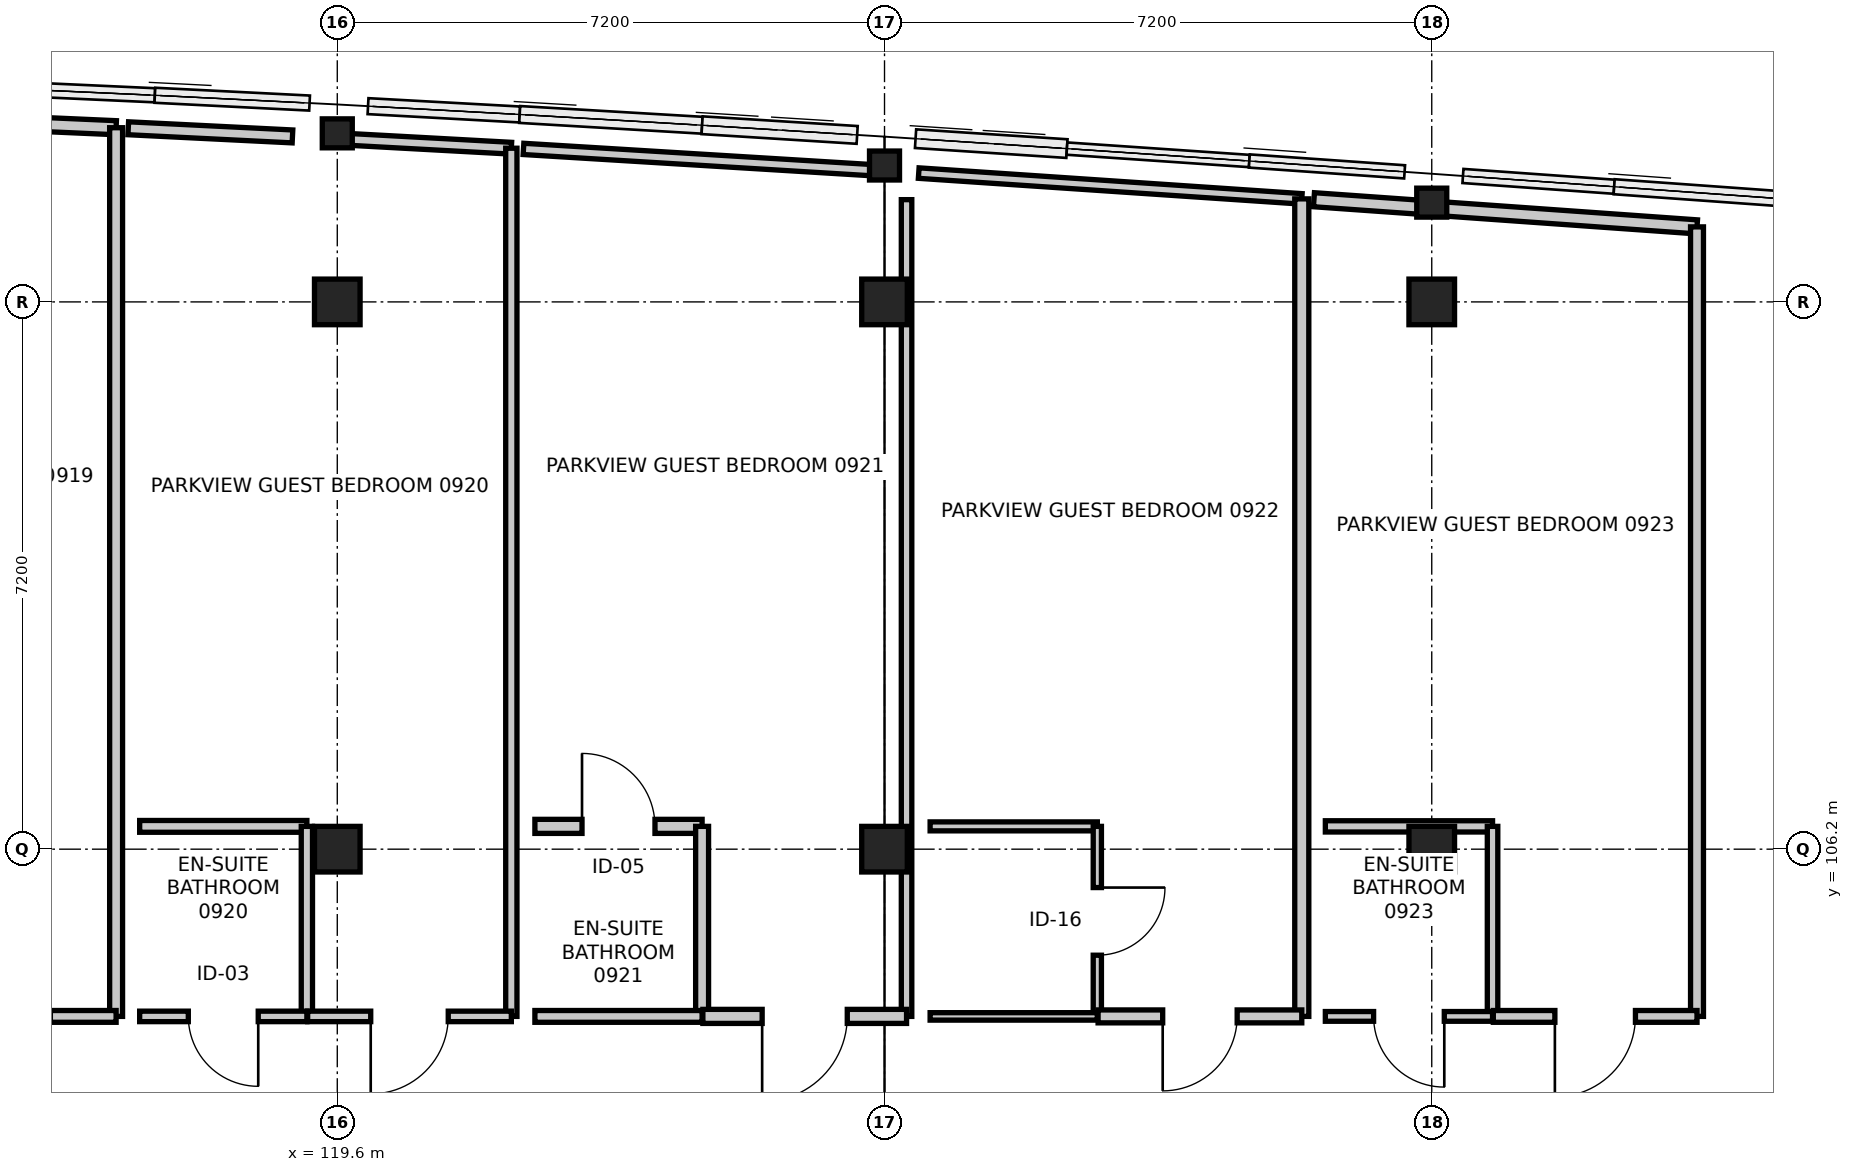
"""IFC4 building model, lengths in metres.
Left out: names, types, materials, properties, quantities, classifications, styles, units other than length and angle.
Written with IfcOpenShell. Run it as: python <this file> out.ifc"""

import sys

from ifc_helpers import new_model, si_unit, direction, frame, frame_2d, origin, origin_2d, place, context, subcontext, project, spatial, rectangle, i_section, extrude, element, fill, save


model = new_model("IFC4")
c1 = context("Model", 3, precision=1e-05, world=origin(), true_north=direction((0.0, 1.0)))
c2 = subcontext(c1, "Body", "Model", "MODEL_VIEW")
j1 = project(units=[si_unit("LENGTHUNIT", "METRE"), si_unit("PLANEANGLEUNIT", "RADIAN")], contexts=[c1])
p1 = place(None, origin())
s1 = spatial("IfcSite", under=j1, at=p1, CompositionType="ELEMENT")
p2 = place(p1, origin())
s2 = spatial("IfcBuilding", under=s1, at=p2, CompositionType="ELEMENT")
p3 = place(p2, frame((0.0, 0.0, 37.2)))
s3 = spatial("IfcBuildingStorey", under=s2, at=p3, CompositionType="ELEMENT", Elevation=37.2)
for number, where, z_axis, x_axis in (
    (1, (119.6, 106.2, 0.0), (0.0, 0.0, 1.0), (1.0, 0.0, 0.0)),
    (2, (119.6, 113.4, 0.0), (0.0, 0.0, 1.0), (1.0, 0.0, 0.0)),
):
    element("IfcColumn", number, at=place(p3, frame(where, z_axis=z_axis, x_axis=x_axis)), inside=s3, PredefinedType="COLUMN", context=c2, shape_type="SweptSolid", body=[
        extrude(rectangle(XDim=0.6, YDim=0.6, at=origin_2d()), origin(), (0.0, 0.0, 1.0), 3.6),
    ])
p4 = place(p3, frame((119.6, 115.618, 0.0), z_axis=(0.0, 0.0, 1.0), x_axis=(1.0, 0.0, 0.0)))
e3 = element("IfcColumn", 3, at=p4, inside=s3, PredefinedType="COLUMN", context=c2, shape_type="SweptSolid", body=[
    extrude(i_section(OverallWidth=0.395, OverallDepth=0.381, WebThickness=0.018, FlangeThickness=0.03, FilletRadius=0.015, at=origin_2d()), origin(), (0.0, 0.0, 1.0), 3.6),
])
for number, where, z_axis, x_axis in (
    (4, (126.8, 106.2, 0.0), (0.0, 0.0, 1.0), (1.0, 0.0, 0.0)),
    (5, (126.8, 113.4, 0.0), (0.0, 0.0, 1.0), (1.0, 0.0, 0.0)),
):
    element("IfcColumn", number, at=place(p3, frame(where, z_axis=z_axis, x_axis=x_axis)), inside=s3, PredefinedType="COLUMN", context=c2, shape_type="SweptSolid", body=[
        extrude(rectangle(XDim=0.6, YDim=0.6, at=origin_2d()), origin(), (0.0, 0.0, 1.0), 3.6),
    ])
p5 = place(p3, frame((126.8, 115.194, 0.0), z_axis=(0.0, 0.0, 1.0), x_axis=(1.0, 0.0, 0.0)))
e6 = element("IfcColumn", 6, at=p5, inside=s3, PredefinedType="COLUMN", context=c2, shape_type="SweptSolid", body=[
    extrude(i_section(OverallWidth=0.395, OverallDepth=0.381, WebThickness=0.018, FlangeThickness=0.03, FilletRadius=0.015, at=origin_2d()), origin(), (0.0, 0.0, 1.0), 3.6),
])
for number, where, z_axis, x_axis in (
    (7, (134.0, 106.2, 0.0), (0.0, 0.0, 1.0), (1.0, 0.0, 0.0)),
    (8, (134.0, 113.4, 0.0), (0.0, 0.0, 1.0), (1.0, 0.0, 0.0)),
):
    element("IfcColumn", number, at=place(p3, frame(where, z_axis=z_axis, x_axis=x_axis)), inside=s3, PredefinedType="COLUMN", context=c2, shape_type="SweptSolid", body=[
        extrude(rectangle(XDim=0.6, YDim=0.6, at=origin_2d()), origin(), (0.0, 0.0, 1.0), 5.2),
    ])
p6 = place(p3, frame((134.0, 114.706, 0.0), z_axis=(0.0, 0.0, 1.0), x_axis=(1.0, 0.0, 0.0)))
e9 = element("IfcColumn", 9, at=p6, inside=s3, PredefinedType="COLUMN", context=c2, shape_type="SweptSolid", body=[
    extrude(i_section(OverallWidth=0.395, OverallDepth=0.381, WebThickness=0.018, FlangeThickness=0.03, FilletRadius=0.015, at=origin_2d()), origin(), (0.0, 0.0, 1.0), 5.2),
])
p7 = place(p3, frame((114.17, 115.803, 0.0), z_axis=(0.0, 0.0, 1.0), x_axis=(0.999025600943, -0.044134438484, 0.0)))
e10 = element("IfcWall", 10, at=p7, inside=s3, PredefinedType="PARTITIONING", context=c2, shape_type="SweptSolid", body=[
    extrude(rectangle(XDim=2.522, YDim=0.185, at=frame_2d((1.261, 0.0))), origin(), (0.0, 0.0, 1.0), 2.956),
])
p8 = place(p3, frame((116.69, 115.692, 0.0), z_axis=(0.0, 0.0, 1.0), x_axis=(0.0, -1.0, 0.0)))
e11 = element("IfcWall", 11, at=p8, inside=s3, PredefinedType="PARTITIONING", context=c2, shape_type="SweptSolid", body=[
    extrude(rectangle(XDim=11.692, YDim=0.17, at=frame_2d((5.846, 0.0))), origin(), (0.0, 0.0, 1.0), 2.765),
])
p9 = place(p3, frame((116.69, 104.0, 0.0), z_axis=(0.0, 0.0, 1.0), x_axis=(-1.0, 0.0, 0.0)))
e12 = element("IfcWall", 12, at=p9, inside=s3, PredefinedType="PARTITIONING", context=c2, shape_type="SweptSolid", body=[
    extrude(rectangle(XDim=2.68, YDim=0.155, at=frame_2d((1.34, 0.0))), origin(), (0.0, 0.0, 1.0), 3.38),
])
p10 = place(p9, frame((0.865, 0.0, 0.0)))
e13 = element("IfcOpeningElement", 13, at=p10, cuts=e12, PredefinedType="OPENING", context=c2, shape_type="SweptSolid", body=[
    extrude(rectangle(XDim=0.95, YDim=2.1, at=frame_2d((0.475, 1.05))), frame((0.0, 0.087, 0.0), z_axis=(0.0, -1.0, 0.0), x_axis=(1.0, 0.0, 0.0)), (0.0, 0.0, 1.0), 0.175),
])
p11 = place(p3, frame((117.0, 106.5, 0.0), z_axis=(0.0, 0.0, 1.0), x_axis=(1.0, 0.0, 0.0)))
e14 = element("IfcWall", 14, at=p11, inside=s3, PredefinedType="PARTITIONING", context=c2, shape_type="SweptSolid", body=[
    extrude(rectangle(XDim=2.2, YDim=0.155, at=frame_2d((1.1, 0.0))), origin(), (0.0, 0.0, 1.0), 3.38),
])
p12 = place(p3, frame((119.2, 106.5, 0.0), z_axis=(0.0, 0.0, 1.0), x_axis=(0.0, -1.0, 0.0)))
e15 = element("IfcWall", 15, at=p12, inside=s3, PredefinedType="PARTITIONING", context=c2, shape_type="SweptSolid", body=[
    extrude(rectangle(XDim=2.5, YDim=0.148, at=frame_2d((1.25, 0.0))), origin(), (0.0, 0.0, 1.0), 2.765),
])
p13 = place(p3, frame((119.2, 104.0, 0.0), z_axis=(0.0, 0.0, 1.0), x_axis=(-1.0, 0.0, 0.0)))
e16 = element("IfcWall", 16, at=p13, inside=s3, PredefinedType="PARTITIONING", context=c2, shape_type="SweptSolid", body=[
    extrude(rectangle(XDim=2.2, YDim=0.138, at=frame_2d((1.1, 0.0))), origin(), (0.0, 0.0, 1.0), 3.38),
])
p14 = place(p13, frame((0.64, 0.0, 0.0)))
e17 = element("IfcOpeningElement", 17, at=p14, cuts=e16, PredefinedType="OPENING", context=c2, shape_type="SweptSolid", body=[
    extrude(rectangle(XDim=0.92, YDim=2.1, at=frame_2d((0.46, 1.05))), frame((0.0, 0.079, 0.0), z_axis=(0.0, -1.0, 0.0), x_axis=(1.0, 0.0, 0.0)), (0.0, 0.0, 1.0), 0.158),
])
p15 = place(p3, frame((116.85, 115.684, 0.0), z_axis=(0.0, 0.0, 1.0), x_axis=(0.998771684577, -0.049549188556, 0.0)))
e18 = element("IfcWall", 18, at=p15, inside=s3, PredefinedType="PARTITIONING", context=c2, shape_type="SweptSolid", body=[
    extrude(rectangle(XDim=2.163, YDim=0.17, at=frame_2d((1.082, 0.0))), origin(), (0.0, 0.0, 1.0), 2.956),
])
p16 = place(p3, frame((119.729, 115.54, 0.0), z_axis=(0.0, 0.0, 1.0), x_axis=(0.99851983335, -0.054388807738, 0.0)))
e19 = element("IfcWall", 19, at=p16, inside=s3, PredefinedType="PARTITIONING", context=c2, shape_type="SweptSolid", body=[
    extrude(rectangle(XDim=2.164, YDim=0.155, at=frame_2d((1.082, 0.0))), origin(), (0.0, 0.0, 1.0), 2.956),
])
p17 = place(p3, frame((121.89, 115.422, 0.0), z_axis=(0.0, 0.0, 1.0), x_axis=(0.0, -1.0, 0.0)))
e20 = element("IfcWall", 20, at=p17, inside=s3, PredefinedType="PARTITIONING", context=c2, shape_type="SweptSolid", body=[
    extrude(rectangle(XDim=11.422, YDim=0.148, at=frame_2d((5.711, 0.0))), origin(), (0.0, 0.0, 1.0), 2.765),
])
p18 = place(p3, frame((121.89, 104.0, 0.0), z_axis=(0.0, 0.0, 1.0), x_axis=(-1.0, 0.0, 0.0)))
e21 = element("IfcWall", 21, at=p18, inside=s3, PredefinedType="PARTITIONING", context=c2, shape_type="SweptSolid", body=[
    extrude(rectangle(XDim=2.68, YDim=0.138, at=frame_2d((1.34, 0.0))), origin(), (0.0, 0.0, 1.0), 2.715),
])
p19 = place(p18, frame((0.83, 0.0, 0.0)))
e22 = element("IfcOpeningElement", 22, at=p19, cuts=e21, PredefinedType="OPENING", context=c2, shape_type="SweptSolid", body=[
    extrude(rectangle(XDim=1.02, YDim=2.15, at=frame_2d((0.51, 1.075))), frame((0.0, 0.079, 0.0), z_axis=(0.0, -1.0, 0.0), x_axis=(1.0, 0.0, 0.0)), (0.0, 0.0, 1.0), 0.158),
])
p20 = place(p3, frame((122.2, 106.5, 0.0), z_axis=(0.0, 0.0, 1.0), x_axis=(1.0, 0.0, 0.0)))
e23 = element("IfcWall", 23, at=p20, inside=s3, PredefinedType="PARTITIONING", context=c2, shape_type="SweptSolid", body=[
    extrude(rectangle(XDim=2.2, YDim=0.185, at=frame_2d((1.1, 0.0))), origin(), (0.0, 0.0, 1.0), 2.765),
])
p21 = place(p20, frame((0.62, 0.0, 0.0)))
e24 = element("IfcOpeningElement", 24, at=p21, cuts=e23, PredefinedType="OPENING", context=c2, shape_type="SweptSolid", body=[
    extrude(rectangle(XDim=0.96, YDim=2.14, at=frame_2d((0.48, 1.07))), frame((0.0, 0.103, 0.0), z_axis=(0.0, -1.0, 0.0), x_axis=(1.0, 0.0, 0.0)), (0.0, 0.0, 1.0), 0.205),
])
p22 = place(p3, frame((124.4, 106.5, 0.0), z_axis=(0.0, 0.0, 1.0), x_axis=(0.0, -1.0, 0.0)))
e25 = element("IfcWall", 25, at=p22, inside=s3, PredefinedType="PARTITIONING", context=c2, shape_type="SweptSolid", body=[
    extrude(rectangle(XDim=2.5, YDim=0.17, at=frame_2d((1.25, 0.0))), origin(), (0.0, 0.0, 1.0), 2.765),
])
p23 = place(p3, frame((124.4, 104.0, 0.0), z_axis=(0.0, 0.0, 1.0), x_axis=(-1.0, 0.0, 0.0)))
e26 = element("IfcWall", 26, at=p23, inside=s3, PredefinedType="PARTITIONING", context=c2, shape_type="SweptSolid", body=[
    extrude(rectangle(XDim=2.2, YDim=0.155, at=frame_2d((1.1, 0.0))), origin(), (0.0, 0.0, 1.0), 3.38),
])
p24 = place(p3, frame((122.05, 115.413, 0.0), z_axis=(0.0, 0.0, 1.0), x_axis=(0.998143068462, -0.060913174948, 0.0)))
e27 = element("IfcWall", 27, at=p24, inside=s3, PredefinedType="PARTITIONING", context=c2, shape_type="SweptSolid", body=[
    extrude(rectangle(XDim=4.689, YDim=0.148, at=frame_2d((2.345, 0.0))), origin(), (0.0, 0.0, 1.0), 2.956),
])
p25 = place(p3, frame((127.09, 114.745, 0.0), z_axis=(0.0, 0.0, 1.0), x_axis=(0.0, -1.0, 0.0)))
e28 = element("IfcWall", 28, at=p25, inside=s3, PredefinedType="PARTITIONING", context=c2, shape_type="SweptSolid", body=[
    extrude(rectangle(XDim=10.745, YDim=0.138, at=frame_2d((5.373, 0.0))), origin(), (0.0, 0.0, 1.0), 2.715),
])
p26 = place(p3, frame((127.09, 104.0, 0.0), z_axis=(0.0, 0.0, 1.0), x_axis=(-1.0, 0.0, 0.0)))
e29 = element("IfcWall", 29, at=p26, inside=s3, PredefinedType="PARTITIONING", context=c2, shape_type="SweptSolid", body=[
    extrude(rectangle(XDim=2.68, YDim=0.185, at=frame_2d((1.34, 0.0))), origin(), (0.0, 0.0, 1.0), 2.715),
])
p27 = place(p26, frame((0.78, 0.0, 0.0)))
e30 = element("IfcOpeningElement", 30, at=p27, cuts=e29, PredefinedType="OPENING", context=c2, shape_type="SweptSolid", body=[
    extrude(rectangle(XDim=1.12, YDim=2.2, at=frame_2d((0.56, 1.1))), frame((0.0, 0.103, 0.0), z_axis=(0.0, -1.0, 0.0), x_axis=(1.0, 0.0, 0.0)), (0.0, 0.0, 1.0), 0.205),
])
p28 = place(p3, frame((127.4, 106.5, 0.0), z_axis=(0.0, 0.0, 1.0), x_axis=(1.0, 0.0, 0.0)))
e31 = element("IfcWall", 31, at=p28, inside=s3, PredefinedType="PARTITIONING", context=c2, shape_type="SweptSolid", body=[
    extrude(rectangle(XDim=2.2, YDim=0.118, at=frame_2d((1.1, 0.0))), origin(), (0.0, 0.0, 1.0), 3.38),
])
p29 = place(p3, frame((129.6, 106.5, 0.0), z_axis=(0.0, 0.0, 1.0), x_axis=(0.0, -1.0, 0.0)))
e32 = element("IfcWall", 32, at=p29, inside=s3, PredefinedType="PARTITIONING", context=c2, shape_type="SweptSolid", body=[
    extrude(rectangle(XDim=2.5, YDim=0.108, at=frame_2d((1.25, 0.0))), origin(), (0.0, 0.0, 1.0), 3.38),
])
p30 = place(p29, frame((0.805, 0.0, 0.0)))
e33 = element("IfcOpeningElement", 33, at=p30, cuts=e32, PredefinedType="OPENING", context=c2, shape_type="SweptSolid", body=[
    extrude(rectangle(XDim=0.89, YDim=2.09, at=frame_2d((0.445, 1.045))), frame((0.0, 0.064, 0.0), z_axis=(0.0, -1.0, 0.0), x_axis=(1.0, 0.0, 0.0)), (0.0, 0.0, 1.0), 0.128),
])
p31 = place(p3, frame((129.6, 104.0, 0.0), z_axis=(0.0, 0.0, 1.0), x_axis=(-1.0, 0.0, 0.0)))
e34 = element("IfcWall", 34, at=p31, inside=s3, PredefinedType="PARTITIONING", context=c2, shape_type="SweptSolid", body=[
    extrude(rectangle(XDim=2.2, YDim=0.098, at=frame_2d((1.1, 0.0))), origin(), (0.0, 0.0, 1.0), 3.38),
])
p32 = place(p3, frame((127.25, 115.095, 0.0), z_axis=(0.0, 0.0, 1.0), x_axis=(0.997740885308, -0.067179801908, 0.0)))
e35 = element("IfcWall", 35, at=p32, inside=s3, PredefinedType="PARTITIONING", context=c2, shape_type="SweptSolid", body=[
    extrude(rectangle(XDim=5.052, YDim=0.138, at=frame_2d((2.526, 0.0))), origin(), (0.0, 0.0, 1.0), 3.38),
])
p33 = place(p3, frame((132.29, 114.755, 0.0), z_axis=(0.0, 0.0, 1.0), x_axis=(0.0, -1.0, 0.0)))
e36 = element("IfcWall", 36, at=p33, inside=s3, PredefinedType="PARTITIONING", context=c2, shape_type="SweptSolid", body=[
    extrude(rectangle(XDim=10.755, YDim=0.185, at=frame_2d((5.378, 0.0))), origin(), (0.0, 0.0, 1.0), 3.38),
])
p34 = place(p3, frame((132.29, 104.0, 0.0), z_axis=(0.0, 0.0, 1.0), x_axis=(-1.0, 0.0, 0.0)))
e37 = element("IfcWall", 37, at=p34, inside=s3, PredefinedType="PARTITIONING", context=c2, shape_type="SweptSolid", body=[
    extrude(rectangle(XDim=2.68, YDim=0.17, at=frame_2d((1.34, 0.0))), origin(), (0.0, 0.0, 1.0), 3.38),
])
p35 = place(p34, frame((0.85, 0.0, 0.0)))
e38 = element("IfcOpeningElement", 38, at=p35, cuts=e37, PredefinedType="OPENING", context=c2, shape_type="SweptSolid", body=[
    extrude(rectangle(XDim=0.98, YDim=2.15, at=frame_2d((0.49, 1.075))), frame((0.0, 0.095, 0.0), z_axis=(0.0, -1.0, 0.0), x_axis=(1.0, 0.0, 0.0)), (0.0, 0.0, 1.0), 0.19),
])
p36 = place(p3, frame((132.6, 106.5, 0.0), z_axis=(0.0, 0.0, 1.0), x_axis=(1.0, 0.0, 0.0)))
e39 = element("IfcWall", 39, at=p36, inside=s3, PredefinedType="PARTITIONING", context=c2, shape_type="SweptSolid", body=[
    extrude(rectangle(XDim=2.2, YDim=0.148, at=frame_2d((1.1, 0.0))), origin(), (0.0, 0.0, 1.0), 2.715),
])
p37 = place(p3, frame((134.8, 106.5, 0.0), z_axis=(0.0, 0.0, 1.0), x_axis=(0.0, -1.0, 0.0)))
e40 = element("IfcWall", 40, at=p37, inside=s3, PredefinedType="PARTITIONING", context=c2, shape_type="SweptSolid", body=[
    extrude(rectangle(XDim=2.5, YDim=0.138, at=frame_2d((1.25, 0.0))), origin(), (0.0, 0.0, 1.0), 2.86),
])
p38 = place(p3, frame((134.8, 104.0, 0.0), z_axis=(0.0, 0.0, 1.0), x_axis=(-1.0, 0.0, 0.0)))
e41 = element("IfcWall", 41, at=p38, inside=s3, PredefinedType="PARTITIONING", context=c2, shape_type="SweptSolid", body=[
    extrude(rectangle(XDim=2.2, YDim=0.128, at=frame_2d((1.1, 0.0))), origin(), (0.0, 0.0, 1.0), 2.715),
])
p39 = place(p38, frame((0.635, 0.0, 0.0)))
e42 = element("IfcOpeningElement", 42, at=p39, cuts=e41, PredefinedType="OPENING", context=c2, shape_type="SweptSolid", body=[
    extrude(rectangle(XDim=0.93, YDim=2.13, at=frame_2d((0.465, 1.065))), frame((0.0, 0.074, 0.0), z_axis=(0.0, -1.0, 0.0), x_axis=(1.0, 0.0, 0.0)), (0.0, 0.0, 1.0), 0.148),
])
p40 = place(p3, frame((132.45, 114.744, 0.0), z_axis=(0.0, 0.0, 1.0), x_axis=(0.99749487084, -0.070738834088, 0.0)))
e43 = element("IfcWall", 43, at=p40, inside=s3, PredefinedType="PARTITIONING", context=c2, shape_type="SweptSolid", body=[
    extrude(rectangle(XDim=5.053, YDim=0.185, at=frame_2d((2.526, 0.0))), origin(), (0.0, 0.0, 1.0), 3.38),
])
p41 = place(p3, frame((137.49, 114.387, 0.0), z_axis=(0.0, 0.0, 1.0), x_axis=(0.0, -1.0, 0.0)))
e44 = element("IfcWall", 44, at=p41, inside=s3, PredefinedType="PARTITIONING", context=c2, shape_type="SweptSolid", body=[
    extrude(rectangle(XDim=10.387, YDim=0.17, at=frame_2d((5.193, 0.0))), origin(), (0.0, 0.0, 1.0), 2.86),
])
p42 = place(p3, frame((137.49, 104.0, 0.0), z_axis=(0.0, 0.0, 1.0), x_axis=(-1.0, 0.0, 0.0)))
e45 = element("IfcWall", 45, at=p42, inside=s3, PredefinedType="PARTITIONING", context=c2, shape_type="SweptSolid", body=[
    extrude(rectangle(XDim=2.68, YDim=0.155, at=frame_2d((1.34, 0.0))), origin(), (0.0, 0.0, 1.0), 3.38),
])
p43 = place(p42, frame((0.81, 0.0, 0.0)))
e46 = element("IfcOpeningElement", 46, at=p43, cuts=e45, PredefinedType="OPENING", context=c2, shape_type="SweptSolid", body=[
    extrude(rectangle(XDim=1.06, YDim=2.2, at=frame_2d((0.53, 1.1))), frame((0.0, 0.087, 0.0), z_axis=(0.0, -1.0, 0.0), x_axis=(1.0, 0.0, 0.0)), (0.0, 0.0, 1.0), 0.175),
])
p44 = place(p14, origin())
e47 = element("IfcDoor", 47, at=p44, inside=s3, OperationType="SINGLE_SWING_LEFT", PredefinedType="DOOR", context=c2, shape_type="SweptSolid", body=[
    extrude(rectangle(XDim=0.92, YDim=2.1, at=frame_2d((0.46, 1.05))), frame((0.0, 0.025, 0.0), z_axis=(0.0, -1.0, 0.0), x_axis=(1.0, 0.0, 0.0)), (0.0, 0.0, 1.0), 0.05),
])
fill(e17, e47)
p45 = place(p19, origin())
e48 = element("IfcDoor", 48, at=p45, inside=s3, OperationType="SINGLE_SWING_RIGHT", PredefinedType="DOOR", context=c2, shape_type="SweptSolid", body=[
    extrude(rectangle(XDim=1.02, YDim=2.15, at=frame_2d((0.51, 1.075))), frame((0.0, 0.025, 0.0), z_axis=(0.0, -1.0, 0.0), x_axis=(1.0, 0.0, 0.0)), (0.0, 0.0, 1.0), 0.05),
])
fill(e22, e48)
p46 = place(p21, origin())
e49 = element("IfcDoor", 49, at=p46, inside=s3, OperationType="SINGLE_SWING_LEFT", PredefinedType="DOOR", context=c2, shape_type="SweptSolid", body=[
    extrude(rectangle(XDim=0.96, YDim=2.14, at=frame_2d((0.48, 1.07))), frame((0.0, 0.025, 0.0), z_axis=(0.0, -1.0, 0.0), x_axis=(1.0, 0.0, 0.0)), (0.0, 0.0, 1.0), 0.05),
])
fill(e24, e49)
p47 = place(p27, origin())
e50 = element("IfcDoor", 50, at=p47, inside=s3, OperationType="SINGLE_SWING_RIGHT", PredefinedType="DOOR", context=c2, shape_type="SweptSolid", body=[
    extrude(rectangle(XDim=1.12, YDim=2.2, at=frame_2d((0.56, 1.1))), frame((0.0, 0.025, 0.0), z_axis=(0.0, -1.0, 0.0), x_axis=(1.0, 0.0, 0.0)), (0.0, 0.0, 1.0), 0.05),
])
fill(e30, e50)
p48 = place(p30, origin())
e51 = element("IfcDoor", 51, at=p48, inside=s3, OperationType="SINGLE_SWING_LEFT", PredefinedType="DOOR", context=c2, shape_type="SweptSolid", body=[
    extrude(rectangle(XDim=0.89, YDim=2.09, at=frame_2d((0.445, 1.045))), frame((0.0, 0.025, 0.0), z_axis=(0.0, -1.0, 0.0), x_axis=(1.0, 0.0, 0.0)), (0.0, 0.0, 1.0), 0.05),
])
fill(e33, e51)
p49 = place(p35, origin())
e52 = element("IfcDoor", 52, at=p49, inside=s3, OperationType="SINGLE_SWING_RIGHT", PredefinedType="DOOR", context=c2, shape_type="SweptSolid", body=[
    extrude(rectangle(XDim=0.98, YDim=2.15, at=frame_2d((0.49, 1.075))), frame((0.0, 0.025, 0.0), z_axis=(0.0, -1.0, 0.0), x_axis=(1.0, 0.0, 0.0)), (0.0, 0.0, 1.0), 0.05),
])
fill(e38, e52)
p50 = place(p39, origin())
e53 = element("IfcDoor", 53, at=p50, inside=s3, OperationType="SINGLE_SWING_LEFT", PredefinedType="DOOR", context=c2, shape_type="SweptSolid", body=[
    extrude(rectangle(XDim=0.93, YDim=2.13, at=frame_2d((0.465, 1.065))), frame((0.0, 0.025, 0.0), z_axis=(0.0, -1.0, 0.0), x_axis=(1.0, 0.0, 0.0)), (0.0, 0.0, 1.0), 0.05),
])
fill(e42, e53)
p51 = place(p43, origin())
e54 = element("IfcDoor", 54, at=p51, inside=s3, OperationType="SINGLE_SWING_RIGHT", PredefinedType="DOOR", context=c2, shape_type="SweptSolid", body=[
    extrude(rectangle(XDim=1.06, YDim=2.2, at=frame_2d((0.53, 1.1))), frame((0.0, 0.025, 0.0), z_axis=(0.0, -1.0, 0.0), x_axis=(1.0, 0.0, 0.0)), (0.0, 0.0, 1.0), 0.05),
])
fill(e46, e54)
save(model, sys.argv[1])
